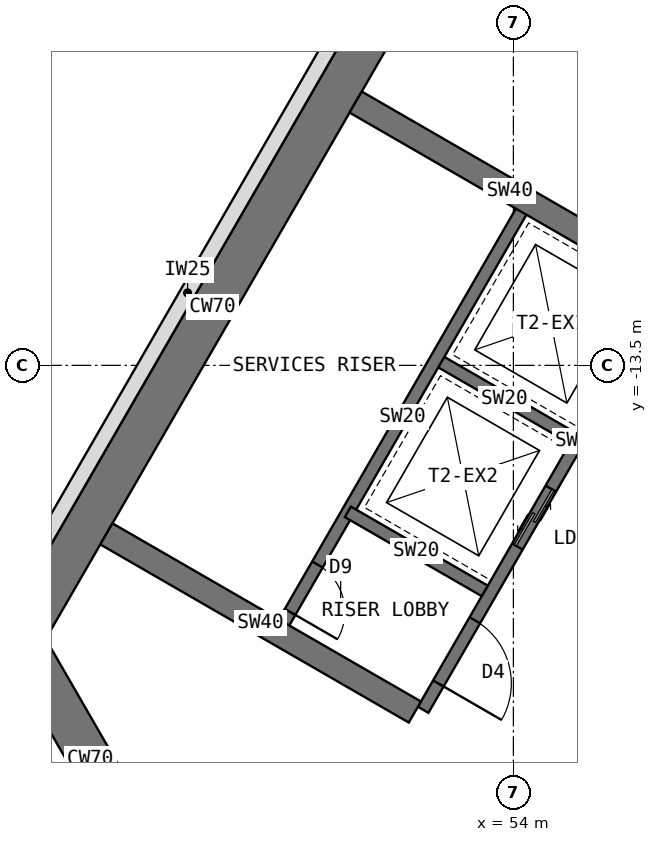
"""IFC4 building model, lengths in metres.
Left out: names, types, materials, properties, quantities, classifications, styles, units other than length and angle.
Written with IfcOpenShell. Run it as: python <this file> out.ifc"""

import sys

from ifc_helpers import new_model, si_unit, direction, frame, frame_2d, origin, place, context, subcontext, project, spatial, rectangle, extrude, element, fill, save


model = new_model("IFC4")
c1 = context("Model", 3, precision=1e-05, world=origin(), true_north=direction((0.0, 1.0)))
c2 = subcontext(c1, "Body", "Model", "MODEL_VIEW")
j1 = project(units=[si_unit("LENGTHUNIT", "METRE"), si_unit("PLANEANGLEUNIT", "RADIAN")], contexts=[c1])
p1 = place(None, origin())
s1 = spatial("IfcSite", under=j1, at=p1, CompositionType="ELEMENT")
p2 = place(p1, origin())
s2 = spatial("IfcBuilding", under=s1, at=p2, CompositionType="ELEMENT")
p3 = place(p2, origin())
s3 = spatial("IfcBuildingStorey", under=s2, at=p3, CompositionType="ELEMENT", Elevation=0.0)
p4 = place(p3, frame((52.202, -7.092, 0.0), z_axis=(0.0, 0.0, 1.0), x_axis=(-0.500005998175, -0.866021940709, 0.0)))
e1 = element("IfcWall", 1, at=p4, inside=s3, PredefinedType="SHEAR", context=c2, shape_type="SweptSolid", body=[
    extrude(rectangle(XDim=12.596, YDim=0.7, at=frame_2d((6.298, 0.0))), origin(), (0.0, 0.0, 1.0), 5.5),
])
p5 = place(p3, frame((45.904, -18.0, 0.0), z_axis=(0.0, 0.0, 1.0), x_axis=(0.500024481964, -0.866011268655, 0.0)))
e2 = element("IfcWall", 2, at=p5, inside=s3, PredefinedType="SHEAR", context=c2, shape_type="SweptSolid", body=[
    extrude(rectangle(XDim=4.548, YDim=0.7, at=frame_2d((2.274, 0.0))), origin(), (0.0, 0.0, 1.0), 5.5),
])
p6 = place(p3, frame((56.516, -12.236, 0.0), z_axis=(0.0, 0.0, 1.0), x_axis=(-0.49999894854, -0.866026010844, 0.0)))
e3 = element("IfcWall", 3, at=p6, inside=s3, PredefinedType="SHEAR", context=c2, shape_type="SweptSolid", body=[
    extrude(rectangle(XDim=8.0, YDim=0.2, at=frame_2d((4.0, 0.0))), origin(), (0.0, 0.0, 1.0), 5.5),
])
p7 = place(p6, frame((6.3, 0.0, 0.0)))
e4 = element("IfcOpeningElement", 4, at=p7, cuts=e3, PredefinedType="OPENING", context=c2, shape_type="SweptSolid", body=[
    extrude(rectangle(XDim=1.2, YDim=2.1, at=frame_2d((0.6, 1.05))), frame((0.0, 0.11, 0.0), z_axis=(0.0, -1.0, 0.0), x_axis=(1.0, 0.0, 0.0)), (0.0, 0.0, 1.0), 0.22),
])
p8 = place(p6, frame((0.9, 0.0, 0.0)))
e5 = element("IfcOpeningElement", 5, at=p8, cuts=e3, PredefinedType="OPENING", context=c2, shape_type="SweptSolid", body=[
    extrude(rectangle(XDim=1.1, YDim=2.2, at=frame_2d((0.55, 1.1))), frame((0.0, 0.11, 0.0), z_axis=(0.0, -1.0, 0.0), x_axis=(1.0, 0.0, 0.0)), (0.0, 0.0, 1.0), 0.22),
])
p9 = place(p6, frame((3.8, 0.0, 0.0)))
e6 = element("IfcOpeningElement", 6, at=p9, cuts=e3, PredefinedType="OPENING", context=c2, shape_type="SweptSolid", body=[
    extrude(rectangle(XDim=1.1, YDim=2.2, at=frame_2d((0.55, 1.1))), frame((0.0, 0.11, 0.0), z_axis=(0.0, -1.0, 0.0), x_axis=(1.0, 0.0, 0.0)), (0.0, 0.0, 1.0), 0.22),
])
for number, where, z_axis, x_axis in (
    (7, (54.98, -14.697, 0.0), (0.0, 0.0, 1.0), (-0.866, 0.5, 0.0)),
    (8, (53.53, -17.209, 0.0), (0.0, 0.0, 1.0), (-0.866, 0.5, 0.0)),
):
    element("IfcWall", number, at=place(p3, frame(where, z_axis=z_axis, x_axis=x_axis)), inside=s3, PredefinedType="SHEAR", context=c2, shape_type="SweptSolid", body=[
        extrude(rectangle(XDim=2.6, YDim=0.2, at=frame_2d((1.3, 0.0))), origin(), (0.0, 0.0, 1.0), 5.5),
    ])
p10 = place(p3, frame((54.178, -10.886, 0.0), z_axis=(0.0, 0.0, 1.0), x_axis=(-0.49999894854, -0.866026010844, 0.0)))
e9 = element("IfcWall", 9, at=p10, inside=s3, PredefinedType="SHEAR", context=c2, shape_type="SweptSolid", body=[
    extrude(rectangle(XDim=8.0, YDim=0.2, at=frame_2d((4.0, 0.0))), origin(), (0.0, 0.0, 1.0), 5.5),
])
p11 = place(p10, frame((6.8, 0.0, 0.0)))
e10 = element("IfcOpeningElement", 10, at=p11, cuts=e9, PredefinedType="OPENING", context=c2, shape_type="SweptSolid", body=[
    extrude(rectangle(XDim=0.9, YDim=2.1, at=frame_2d((0.45, 1.05))), frame((0.0, 0.11, 0.0), z_axis=(0.0, -1.0, 0.0), x_axis=(1.0, 0.0, 0.0)), (0.0, 0.0, 1.0), 0.22),
])
for number, where, z_axis, x_axis in (
    (11, (52.38, -19.201, 0.0), (0.0, 0.0, 1.0), (-0.866, 0.5, 0.0)),
    (12, (56.48, -12.099, 0.0), (0.0, 0.0, 1.0), (-0.866, 0.5, 0.0)),
):
    element("IfcWall", number, at=place(p3, frame(where, z_axis=z_axis, x_axis=x_axis)), inside=s3, PredefinedType="SHEAR", context=c2, shape_type="SweptSolid", body=[
        extrude(rectangle(XDim=5.858, YDim=0.4, at=frame_2d((2.929, 0.0))), origin(), (0.0, 0.0, 1.0), 5.5),
    ])
p12 = place(p3, frame((45.658, -17.476, 0.0), z_axis=(0.0, 0.0, 1.0), x_axis=(0.499996365031, 0.866027502425, 0.0)))
e13 = element("IfcWall", 13, at=p12, inside=s3, PredefinedType="STANDARD", context=c2, shape_type="SweptSolid", body=[
    extrude(rectangle(XDim=11.933, YDim=0.25, at=frame_2d((5.967, 0.0))), origin(), (0.0, 0.0, 1.0), 5.15),
])
p13 = place(p7, origin())
e14 = element("IfcDoor", 14, at=p13, inside=s3, OperationType="SINGLE_SWING_RIGHT", PredefinedType="DOOR", context=c2, shape_type="SweptSolid", body=[
    extrude(rectangle(XDim=1.2, YDim=2.1, at=frame_2d((0.6, 1.05))), frame((0.0, 0.025, 0.0), z_axis=(0.0, -1.0, 0.0), x_axis=(1.0, 0.0, 0.0)), (0.0, 0.0, 1.0), 0.05),
])
fill(e4, e14)
p14 = place(p9, origin())
e15 = element("IfcDoor", 15, at=p14, inside=s3, OperationType="DOUBLE_DOOR_SLIDING", PredefinedType="DOOR", context=c2, shape_type="SweptSolid", body=[
    extrude(rectangle(XDim=1.1, YDim=2.2, at=frame_2d((0.55, 1.1))), frame((0.0, 0.025, 0.0), z_axis=(0.0, -1.0, 0.0), x_axis=(1.0, 0.0, 0.0)), (0.0, 0.0, 1.0), 0.05),
])
fill(e6, e15)
p15 = place(p11, origin())
e16 = element("IfcDoor", 16, at=p15, inside=s3, OperationType="SINGLE_SWING_RIGHT", PredefinedType="DOOR", context=c2, shape_type="SweptSolid", body=[
    extrude(rectangle(XDim=0.9, YDim=2.1, at=frame_2d((0.45, 1.05))), frame((0.0, 0.025, 0.0), z_axis=(0.0, -1.0, 0.0), x_axis=(1.0, 0.0, 0.0)), (0.0, 0.0, 1.0), 0.05),
])
fill(e10, e16)
save(model, sys.argv[1])
